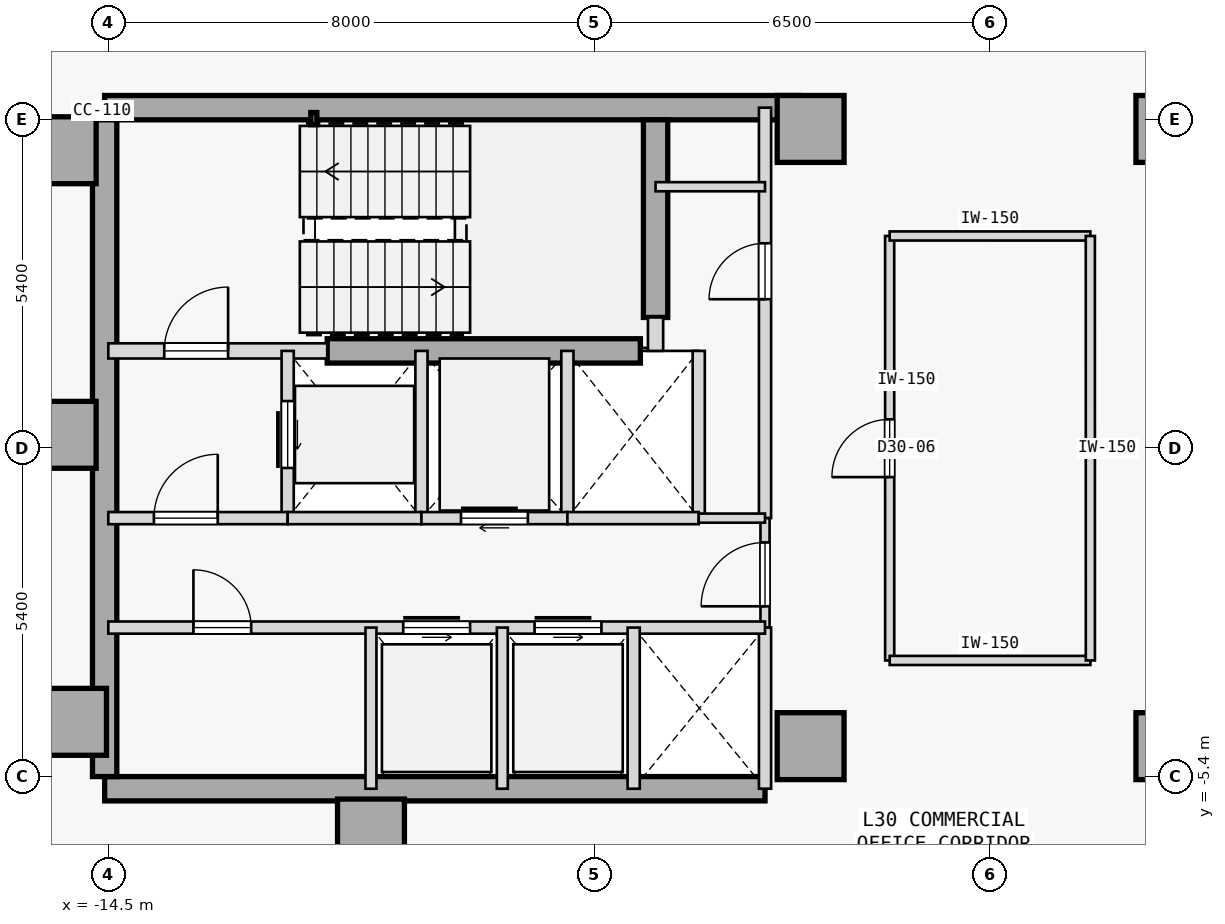
"""IFC4 building model, lengths in metres.
Left out: names, types, materials, properties, quantities, classifications, styles, units other than length and angle.
Written with IfcOpenShell. Run it as: python <this file> out.ifc"""

import sys

from ifc_helpers import new_model, si_unit, direction, frame, frame_2d, origin, origin_2d, place, context, subcontext, project, spatial, rectangle, hollow_rectangle, extrude, element, fill, save


model = new_model("IFC4")
c1 = context("Model", 3, precision=1e-05, world=origin(), true_north=direction((0.0, 1.0)))
c2 = subcontext(c1, "Body", "Model", "MODEL_VIEW")
j1 = project(units=[si_unit("LENGTHUNIT", "METRE"), si_unit("PLANEANGLEUNIT", "RADIAN")], contexts=[c1])
p1 = place(None, origin())
s1 = spatial("IfcSite", under=j1, at=p1, CompositionType="ELEMENT")
p2 = place(p1, origin())
s2 = spatial("IfcBuilding", under=s1, at=p2, CompositionType="ELEMENT")
p3 = place(p2, frame((0.0, 0.0, 120.7)))
s3 = spatial("IfcBuildingStorey", under=s2, at=p3, CompositionType="ELEMENT", Elevation=120.7)
for number, where, z_axis, x_axis in (
    (1, (-15.25, 4.9, 0.0), (0.0, 0.0, 1.0), (1.0, 0.0, 0.0)),
    (2, (-15.25, 0.22, 0.0), (0.0, 0.0, 1.0), (1.0, 0.0, 0.0)),
    (3, (-15.08, -4.5, 0.0), (0.0, 0.0, 1.0), (1.0, 0.0, 0.0)),
    (4, (-10.18, -6.32, 0.0), (0.0, 0.0, 1.0), (1.0, 0.0, 0.0)),
    (5, (-2.95, -4.9, 0.0), (0.0, 0.0, 1.0), (1.0, 0.0, 0.0)),
    (6, (-2.95, 5.25, 0.0), (0.0, 0.0, 1.0), (1.0, 0.0, 0.0)),
    (7, (2.95, -4.9, 0.0), (0.0, 0.0, 1.0), (1.0, 0.0, 0.0)),
    (8, (2.95, 5.25, 0.0), (0.0, 0.0, 1.0), (1.0, 0.0, 0.0)),
):
    element("IfcColumn", number, at=place(p3, frame(where, z_axis=z_axis, x_axis=x_axis)), inside=s3, PredefinedType="COLUMN", context=c2, shape_type="SweptSolid", body=[
        extrude(rectangle(XDim=1.1, YDim=1.1, at=origin_2d()), origin(), (0.0, 0.0, 1.0), 3.7),
    ])
p4 = place(p3, frame((-14.56, 5.6, 0.0), z_axis=(0.0, 0.0, 1.0), x_axis=(1.0, 0.0, 0.0)))
e9 = element("IfcWall", 9, at=p4, inside=s3, PredefinedType="SHEAR", context=c2, shape_type="SweptSolid", body=[
    extrude(rectangle(XDim=11.41, YDim=0.4, at=frame_2d((5.705, 0.0))), origin(), (0.0, 0.0, 1.0), 3.475),
])
p5 = place(p3, frame((-14.56, -5.6, 0.0), z_axis=(0.0, 0.0, 1.0), x_axis=(1.0, 0.0, 0.0)))
e10 = element("IfcWall", 10, at=p5, inside=s3, PredefinedType="SHEAR", context=c2, shape_type="SweptSolid", body=[
    extrude(rectangle(XDim=10.86, YDim=0.4, at=frame_2d((5.43, 0.0))), origin(), (0.0, 0.0, 1.0), 3.475),
])
p6 = place(p3, frame((-14.56, -5.4, 0.0), z_axis=(0.0, 0.0, 1.0), x_axis=(0.0, 1.0, 0.0)))
e11 = element("IfcWall", 11, at=p6, inside=s3, PredefinedType="SHEAR", context=c2, shape_type="SweptSolid", body=[
    extrude(rectangle(XDim=10.8, YDim=0.4, at=frame_2d((5.4, 0.0))), origin(), (0.0, 0.0, 1.0), 3.475),
])
p7 = place(p3, frame((-5.5, 2.15, 0.0), z_axis=(0.0, 0.0, 1.0), x_axis=(0.0, 1.0, 0.0)))
e12 = element("IfcWall", 12, at=p7, inside=s3, PredefinedType="SHEAR", context=c2, shape_type="SweptSolid", body=[
    extrude(rectangle(XDim=3.25, YDim=0.4, at=frame_2d((1.625, 0.0))), origin(), (0.0, 0.0, 1.0), 3.475),
])
p8 = place(p3, frame((-10.9, 1.6, 0.0), z_axis=(0.0, 0.0, 1.0), x_axis=(1.0, 0.0, 0.0)))
e13 = element("IfcWall", 13, at=p8, inside=s3, PredefinedType="SHEAR", context=c2, shape_type="SweptSolid", body=[
    extrude(rectangle(XDim=5.15, YDim=0.4, at=frame_2d((2.575, 0.0))), origin(), (0.0, 0.0, 1.0), 3.475),
])
p9 = place(p3, frame((-11.12, 5.42, 0.0), z_axis=(0.0, 0.0, 1.0), x_axis=(1.0, 0.0, 0.0)))
e14 = element("IfcColumn", 14, at=p9, inside=s3, PredefinedType="COLUMN", context=c2, shape_type="SweptSolid", body=[
    extrude(hollow_rectangle(XDim=0.1, YDim=0.2, WallThickness=0.008, at=origin_2d()), origin(), (0.0, 0.0, 1.0), 3.7),
])
p10 = place(p3, frame((-14.5, 1.6, 0.0), z_axis=(0.0, 0.0, 1.0), x_axis=(1.0, 0.0, 0.0)))
e15 = element("IfcWall", 15, at=p10, inside=s3, PredefinedType="STANDARD", context=c2, shape_type="SweptSolid", body=[
    extrude(rectangle(XDim=3.6, YDim=0.25, at=frame_2d((1.8, 0.0))), origin(), (0.0, 0.0, 1.0), 3.475),
])
p11 = place(p10, frame((0.92, 0.0, 0.0)))
e16 = element("IfcOpeningElement", 16, at=p11, cuts=e15, PredefinedType="OPENING", context=c2, shape_type="SweptSolid", body=[
    extrude(rectangle(XDim=1.05, YDim=2.15, at=frame_2d((0.525, 1.075))), frame((0.0, 0.135, 0.0), z_axis=(0.0, -1.0, 0.0), x_axis=(1.0, 0.0, 0.0)), (0.0, 0.0, 1.0), 0.27),
])
p12 = place(p3, frame((-5.5, 1.6, 0.0), z_axis=(0.0, 0.0, 1.0), x_axis=(0.0, 1.0, 0.0)))
e17 = element("IfcWall", 17, at=p12, inside=s3, PredefinedType="STANDARD", context=c2, shape_type="SweptSolid", body=[
    extrude(rectangle(XDim=0.55, YDim=0.25, at=frame_2d((0.275, 0.0))), origin(), (0.0, 0.0, 1.0), 3.475),
])
p13 = place(p3, frame((-3.7, -1.15, 0.0), z_axis=(0.0, 0.0, 1.0), x_axis=(0.0, 1.0, 0.0)))
e18 = element("IfcWall", 18, at=p13, inside=s3, PredefinedType="STANDARD", context=c2, shape_type="SweptSolid", body=[
    extrude(rectangle(XDim=6.75, YDim=0.2, at=frame_2d((3.375, 0.0))), origin(), (0.0, 0.0, 1.0), 3.475),
])
p14 = place(p13, frame((3.6, 0.0, 0.0)))
e19 = element("IfcOpeningElement", 19, at=p14, cuts=e18, PredefinedType="OPENING", context=c2, shape_type="SweptSolid", body=[
    extrude(rectangle(XDim=0.92, YDim=2.15, at=frame_2d((0.46, 1.075))), frame((0.0, 0.11, 0.0), z_axis=(0.0, -1.0, 0.0), x_axis=(1.0, 0.0, 0.0)), (0.0, 0.0, 1.0), 0.22),
])
p15 = place(p3, frame((-3.7, -2.95, 0.0), z_axis=(0.0, 0.0, 1.0), x_axis=(0.0, 1.0, 0.0)))
e20 = element("IfcWall", 20, at=p15, inside=s3, PredefinedType="PARTITIONING", context=c2, shape_type="SweptSolid", body=[
    extrude(rectangle(XDim=1.8, YDim=0.15, at=frame_2d((0.9, 0.0))), origin(), (0.0, 0.0, 1.0), 3.475),
])
p16 = place(p15, frame((0.35, 0.0, 0.0)))
e21 = element("IfcOpeningElement", 21, at=p16, cuts=e20, PredefinedType="OPENING", context=c2, shape_type="SweptSolid", body=[
    extrude(rectangle(XDim=1.05, YDim=2.18, at=frame_2d((0.525, 1.09))), frame((0.0, 0.085, 0.0), z_axis=(0.0, -1.0, 0.0), x_axis=(1.0, 0.0, 0.0)), (0.0, 0.0, 1.0), 0.17),
])
p17 = place(p3, frame((-3.7, -5.6, 0.0), z_axis=(0.0, 0.0, 1.0), x_axis=(0.0, 1.0, 0.0)))
e22 = element("IfcWall", 22, at=p17, inside=s3, PredefinedType="STANDARD", context=c2, shape_type="SweptSolid", body=[
    extrude(rectangle(XDim=2.65, YDim=0.2, at=frame_2d((1.325, 0.0))), origin(), (0.0, 0.0, 1.0), 3.475),
])
p18 = place(p3, frame((-11.55, -1.15, 0.0), z_axis=(0.0, 0.0, 1.0), x_axis=(0.0, 1.0, 0.0)))
e23 = element("IfcWall", 23, at=p18, inside=s3, PredefinedType="STANDARD", context=c2, shape_type="SweptSolid", body=[
    extrude(rectangle(XDim=2.75, YDim=0.2, at=frame_2d((1.375, 0.0))), origin(), (0.0, 0.0, 1.0), 3.475),
])
p19 = place(p18, frame((0.825, 0.0, 0.0)))
e24 = element("IfcOpeningElement", 24, at=p19, cuts=e23, PredefinedType="OPENING", context=c2, shape_type="SweptSolid", body=[
    extrude(rectangle(XDim=1.1, YDim=2.15, at=frame_2d((0.55, 1.075))), frame((0.0, 0.11, 0.0), z_axis=(0.0, -1.0, 0.0), x_axis=(1.0, 0.0, 0.0)), (0.0, 0.0, 1.0), 0.22),
])
p20 = place(p3, frame((-9.35, -1.15, 0.0), z_axis=(0.0, 0.0, 1.0), x_axis=(0.0, 1.0, 0.0)))
e25 = element("IfcWall", 25, at=p20, inside=s3, PredefinedType="STANDARD", context=c2, shape_type="SweptSolid", body=[
    extrude(rectangle(XDim=2.75, YDim=0.2, at=frame_2d((1.375, 0.0))), origin(), (0.0, 0.0, 1.0), 3.475),
])
p21 = place(p3, frame((-14.5, -1.15, 0.0), z_axis=(0.0, 0.0, 1.0), x_axis=(1.0, 0.0, 0.0)))
e26 = element("IfcWall", 26, at=p21, inside=s3, PredefinedType="STANDARD", context=c2, shape_type="SweptSolid", body=[
    extrude(rectangle(XDim=2.95, YDim=0.2, at=frame_2d((1.475, 0.0))), origin(), (0.0, 0.0, 1.0), 3.475),
])
p22 = place(p21, frame((0.75, 0.0, 0.0)))
e27 = element("IfcOpeningElement", 27, at=p22, cuts=e26, PredefinedType="OPENING", context=c2, shape_type="SweptSolid", body=[
    extrude(rectangle(XDim=1.05, YDim=2.18, at=frame_2d((0.525, 1.09))), frame((0.0, 0.11, 0.0), z_axis=(0.0, -1.0, 0.0), x_axis=(1.0, 0.0, 0.0)), (0.0, 0.0, 1.0), 0.22),
])
p23 = place(p3, frame((-11.55, -1.15, 0.0), z_axis=(0.0, 0.0, 1.0), x_axis=(1.0, 0.0, 0.0)))
e28 = element("IfcWall", 28, at=p23, inside=s3, PredefinedType="STANDARD", context=c2, shape_type="SweptSolid", body=[
    extrude(rectangle(XDim=2.2, YDim=0.2, at=frame_2d((1.1, 0.0))), origin(), (0.0, 0.0, 1.0), 3.475),
])
p24 = place(p3, frame((-6.95, -1.15, 0.0), z_axis=(0.0, 0.0, 1.0), x_axis=(0.0, 1.0, 0.0)))
e29 = element("IfcWall", 29, at=p24, inside=s3, PredefinedType="STANDARD", context=c2, shape_type="SweptSolid", body=[
    extrude(rectangle(XDim=2.75, YDim=0.2, at=frame_2d((1.375, 0.0))), origin(), (0.0, 0.0, 1.0), 3.475),
])
p25 = place(p3, frame((-9.35, -1.15, 0.0), z_axis=(0.0, 0.0, 1.0), x_axis=(1.0, 0.0, 0.0)))
e30 = element("IfcWall", 30, at=p25, inside=s3, PredefinedType="STANDARD", context=c2, shape_type="SweptSolid", body=[
    extrude(rectangle(XDim=2.4, YDim=0.2, at=frame_2d((1.2, 0.0))), origin(), (0.0, 0.0, 1.0), 3.475),
])
p26 = place(p25, frame((0.65, 0.0, 0.0)))
e31 = element("IfcOpeningElement", 31, at=p26, cuts=e30, PredefinedType="OPENING", context=c2, shape_type="SweptSolid", body=[
    extrude(rectangle(XDim=1.1, YDim=2.15, at=frame_2d((0.55, 1.075))), frame((0.0, 0.11, 0.0), z_axis=(0.0, -1.0, 0.0), x_axis=(1.0, 0.0, 0.0)), (0.0, 0.0, 1.0), 0.22),
])
p27 = place(p3, frame((-4.79, -1.15, 0.0), z_axis=(0.0, 0.0, 1.0), x_axis=(0.0, 1.0, 0.0)))
e32 = element("IfcWall", 32, at=p27, inside=s3, PredefinedType="STANDARD", context=c2, shape_type="SweptSolid", body=[
    extrude(rectangle(XDim=2.75, YDim=0.2, at=frame_2d((1.375, 0.0))), origin(), (0.0, 0.0, 1.0), 3.475),
])
p28 = place(p3, frame((-6.95, -1.15, 0.0), z_axis=(0.0, 0.0, 1.0), x_axis=(1.0, 0.0, 0.0)))
e33 = element("IfcWall", 33, at=p28, inside=s3, PredefinedType="STANDARD", context=c2, shape_type="SweptSolid", body=[
    extrude(rectangle(XDim=2.16, YDim=0.2, at=frame_2d((1.08, 0.0))), origin(), (0.0, 0.0, 1.0), 3.475),
])
p29 = place(p3, frame((-4.79, -1.15, 0.0), z_axis=(0.0, 0.0, 1.0), x_axis=(1.0, 0.0, 0.0)))
e34 = element("IfcWall", 34, at=p29, inside=s3, PredefinedType="PARTITIONING", context=c2, shape_type="SweptSolid", body=[
    extrude(rectangle(XDim=1.09, YDim=0.15, at=frame_2d((0.545, 0.0))), origin(), (0.0, 0.0, 1.0), 3.475),
])
p30 = place(p3, frame((-14.5, -2.95, 0.0), z_axis=(0.0, 0.0, 1.0), x_axis=(1.0, 0.0, 0.0)))
e35 = element("IfcWall", 35, at=p30, inside=s3, PredefinedType="STANDARD", context=c2, shape_type="SweptSolid", body=[
    extrude(rectangle(XDim=10.8, YDim=0.2, at=frame_2d((5.4, 0.0))), origin(), (0.0, 0.0, 1.0), 3.475),
])
p31 = place(p30, frame((4.85, 0.0, 0.0)))
e36 = element("IfcOpeningElement", 36, at=p31, cuts=e35, PredefinedType="OPENING", context=c2, shape_type="SweptSolid", body=[
    extrude(rectangle(XDim=1.1, YDim=2.15, at=frame_2d((0.55, 1.075))), frame((0.0, 0.11, 0.0), z_axis=(0.0, -1.0, 0.0), x_axis=(1.0, 0.0, 0.0)), (0.0, 0.0, 1.0), 0.22),
])
p32 = place(p30, frame((7.01, 0.0, 0.0)))
e37 = element("IfcOpeningElement", 37, at=p32, cuts=e35, PredefinedType="OPENING", context=c2, shape_type="SweptSolid", body=[
    extrude(rectangle(XDim=1.1, YDim=2.15, at=frame_2d((0.55, 1.075))), frame((0.0, 0.11, 0.0), z_axis=(0.0, -1.0, 0.0), x_axis=(1.0, 0.0, 0.0)), (0.0, 0.0, 1.0), 0.22),
])
p33 = place(p30, frame((1.4, 0.0, 0.0)))
e38 = element("IfcOpeningElement", 38, at=p33, cuts=e35, PredefinedType="OPENING", context=c2, shape_type="SweptSolid", body=[
    extrude(rectangle(XDim=0.95, YDim=2.15, at=frame_2d((0.475, 1.075))), frame((0.0, 0.11, 0.0), z_axis=(0.0, -1.0, 0.0), x_axis=(1.0, 0.0, 0.0)), (0.0, 0.0, 1.0), 0.22),
])
p34 = place(p3, frame((-5.86, -5.6, 0.0), z_axis=(0.0, 0.0, 1.0), x_axis=(0.0, 1.0, 0.0)))
e39 = element("IfcWall", 39, at=p34, inside=s3, PredefinedType="STANDARD", context=c2, shape_type="SweptSolid", body=[
    extrude(rectangle(XDim=2.65, YDim=0.2, at=frame_2d((1.325, 0.0))), origin(), (0.0, 0.0, 1.0), 3.475),
])
for number, where, z_axis, x_axis in (
    (40, (-10.18, -5.6, 0.0), (0.0, 0.0, 1.0), (0.0, 1.0, 0.0)),
    (41, (-8.02, -5.6, 0.0), (0.0, 0.0, 1.0), (0.0, 1.0, 0.0)),
):
    element("IfcWall", number, at=place(p3, frame(where, z_axis=z_axis, x_axis=x_axis)), inside=s3, PredefinedType="STANDARD", context=c2, shape_type="SweptSolid", body=[
        extrude(rectangle(XDim=2.65, YDim=0.18, at=frame_2d((1.325, 0.0))), origin(), (0.0, 0.0, 1.0), 3.475),
    ])
p35 = place(p3, frame((-5.5, 4.3, 0.0), z_axis=(0.0, 0.0, 1.0), x_axis=(1.0, 0.0, 0.0)))
e42 = element("IfcWall", 42, at=p35, inside=s3, PredefinedType="PARTITIONING", context=c2, shape_type="SweptSolid", body=[
    extrude(rectangle(XDim=1.8, YDim=0.15, at=frame_2d((0.9, 0.0))), origin(), (0.0, 0.0, 1.0), 3.475),
])
p36 = place(p3, frame((-1.65, -3.49, 0.0), z_axis=(0.0, 0.0, 1.0), x_axis=(-0.000104928124, 0.999999994495, 0.0)))
e43 = element("IfcWall", 43, at=p36, inside=s3, PredefinedType="PARTITIONING", context=c2, shape_type="SweptSolid", body=[
    extrude(rectangle(XDim=6.98, YDim=0.15, at=frame_2d((3.49, 0.0))), origin(), (0.0, 0.0, 1.0), 3.475),
])
p37 = place(p36, frame((3.015, 0.0, 0.0)))
e44 = element("IfcOpeningElement", 44, at=p37, cuts=e43, PredefinedType="OPENING", context=c2, shape_type="SweptSolid", body=[
    extrude(rectangle(XDim=0.95, YDim=2.15, at=frame_2d((0.475, 1.075))), frame((0.0, 0.085, 0.0), z_axis=(0.0, -1.0, 0.0), x_axis=(1.0, 0.0, 0.0)), (0.0, 0.0, 1.0), 0.17),
])
p38 = place(p3, frame((-1.65, -3.49, 0.0), z_axis=(0.0, 0.0, 1.0), x_axis=(1.0, 0.0, 0.0)))
e45 = element("IfcWall", 45, at=p38, inside=s3, PredefinedType="PARTITIONING", context=c2, shape_type="SweptSolid", body=[
    extrude(rectangle(XDim=3.3, YDim=0.15, at=frame_2d((1.65, 0.0))), origin(), (0.0, 0.0, 1.0), 3.475),
])
p39 = place(p3, frame((-1.65, 3.49, 0.0), z_axis=(0.0, 0.0, 1.0), x_axis=(1.0, 0.0, 0.0)))
e46 = element("IfcWall", 46, at=p39, inside=s3, PredefinedType="PARTITIONING", context=c2, shape_type="SweptSolid", body=[
    extrude(rectangle(XDim=3.3, YDim=0.15, at=frame_2d((1.65, 0.0))), origin(), (0.0, 0.0, 1.0), 3.475),
])
p40 = place(p3, frame((1.65, -3.49, 0.0), z_axis=(0.0, 0.0, 1.0), x_axis=(-6.9952083e-05, 0.999999997553, 0.0)))
e47 = element("IfcWall", 47, at=p40, inside=s3, PredefinedType="PARTITIONING", context=c2, shape_type="SweptSolid", body=[
    extrude(rectangle(XDim=6.98, YDim=0.15, at=frame_2d((3.49, 0.0))), origin(), (0.0, 0.0, 1.0), 3.475),
])
p41 = place(p11, origin())
e48 = element("IfcDoor", 48, at=p41, inside=s3, OperationType="SINGLE_SWING_RIGHT", PredefinedType="DOOR", context=c2, shape_type="SweptSolid", body=[
    extrude(rectangle(XDim=1.05, YDim=2.15, at=frame_2d((0.525, 1.075))), frame((0.0, 0.025, 0.0), z_axis=(0.0, -1.0, 0.0), x_axis=(1.0, 0.0, 0.0)), (0.0, 0.0, 1.0), 0.05),
])
fill(e16, e48)
p42 = place(p22, origin())
e49 = element("IfcDoor", 49, at=p42, inside=s3, OperationType="SINGLE_SWING_RIGHT", PredefinedType="DOOR", context=c2, shape_type="SweptSolid", body=[
    extrude(rectangle(XDim=1.05, YDim=2.18, at=frame_2d((0.525, 1.09))), frame((0.0, 0.025, 0.0), z_axis=(0.0, -1.0, 0.0), x_axis=(1.0, 0.0, 0.0)), (0.0, 0.0, 1.0), 0.05),
])
fill(e27, e49)
p43 = place(p16, origin())
e50 = element("IfcDoor", 50, at=p43, inside=s3, OperationType="SINGLE_SWING_LEFT", PredefinedType="DOOR", context=c2, shape_type="SweptSolid", body=[
    extrude(rectangle(XDim=1.05, YDim=2.18, at=frame_2d((0.525, 1.09))), frame((0.0, 0.025, 0.0), z_axis=(0.0, -1.0, 0.0), x_axis=(1.0, 0.0, 0.0)), (0.0, 0.0, 1.0), 0.05),
])
fill(e21, e50)
p44 = place(p19, origin())
e51 = element("IfcDoor", 51, at=p44, inside=s3, OperationType="SLIDING_TO_RIGHT", PredefinedType="DOOR", context=c2, shape_type="SweptSolid", body=[
    extrude(rectangle(XDim=1.1, YDim=2.15, at=frame_2d((0.55, 1.075))), frame((0.0, 0.025, 0.0), z_axis=(0.0, -1.0, 0.0), x_axis=(1.0, 0.0, 0.0)), (0.0, 0.0, 1.0), 0.05),
])
fill(e24, e51)
p45 = place(p26, origin())
e52 = element("IfcDoor", 52, at=p45, inside=s3, OperationType="SLIDING_TO_RIGHT", PredefinedType="DOOR", context=c2, shape_type="SweptSolid", body=[
    extrude(rectangle(XDim=1.1, YDim=2.15, at=frame_2d((0.55, 1.075))), frame((0.0, 0.025, 0.0), z_axis=(0.0, -1.0, 0.0), x_axis=(1.0, 0.0, 0.0)), (0.0, 0.0, 1.0), 0.05),
])
fill(e31, e52)
p46 = place(p31, origin())
e53 = element("IfcDoor", 53, at=p46, inside=s3, OperationType="SLIDING_TO_LEFT", PredefinedType="DOOR", context=c2, shape_type="SweptSolid", body=[
    extrude(rectangle(XDim=1.1, YDim=2.15, at=frame_2d((0.55, 1.075))), frame((0.0, 0.025, 0.0), z_axis=(0.0, -1.0, 0.0), x_axis=(1.0, 0.0, 0.0)), (0.0, 0.0, 1.0), 0.05),
])
fill(e36, e53)
p47 = place(p32, origin())
e54 = element("IfcDoor", 54, at=p47, inside=s3, OperationType="SLIDING_TO_LEFT", PredefinedType="DOOR", context=c2, shape_type="SweptSolid", body=[
    extrude(rectangle(XDim=1.1, YDim=2.15, at=frame_2d((0.55, 1.075))), frame((0.0, 0.025, 0.0), z_axis=(0.0, -1.0, 0.0), x_axis=(1.0, 0.0, 0.0)), (0.0, 0.0, 1.0), 0.05),
])
fill(e37, e54)
p48 = place(p33, origin())
e55 = element("IfcDoor", 55, at=p48, inside=s3, OperationType="SINGLE_SWING_LEFT", PredefinedType="DOOR", context=c2, shape_type="SweptSolid", body=[
    extrude(rectangle(XDim=0.95, YDim=2.15, at=frame_2d((0.475, 1.075))), frame((0.0, 0.025, 0.0), z_axis=(0.0, -1.0, 0.0), x_axis=(1.0, 0.0, 0.0)), (0.0, 0.0, 1.0), 0.05),
])
fill(e38, e55)
p49 = place(p14, origin())
e56 = element("IfcDoor", 56, at=p49, inside=s3, OperationType="SINGLE_SWING_LEFT", PredefinedType="DOOR", context=c2, shape_type="SweptSolid", body=[
    extrude(rectangle(XDim=0.92, YDim=2.15, at=frame_2d((0.46, 1.075))), frame((0.0, 0.025, 0.0), z_axis=(0.0, -1.0, 0.0), x_axis=(1.0, 0.0, 0.0)), (0.0, 0.0, 1.0), 0.05),
])
fill(e19, e56)
p50 = place(p37, origin())
e57 = element("IfcDoor", 57, at=p50, inside=s3, OperationType="SINGLE_SWING_LEFT", PredefinedType="DOOR", context=c2, shape_type="SweptSolid", body=[
    extrude(rectangle(XDim=0.95, YDim=2.15, at=frame_2d((0.475, 1.075))), frame((0.0, 0.025, 0.0), z_axis=(0.0, -1.0, 0.0), x_axis=(1.0, 0.0, 0.0)), (0.0, 0.0, 1.0), 0.05),
])
fill(e44, e57)
save(model, sys.argv[1])
